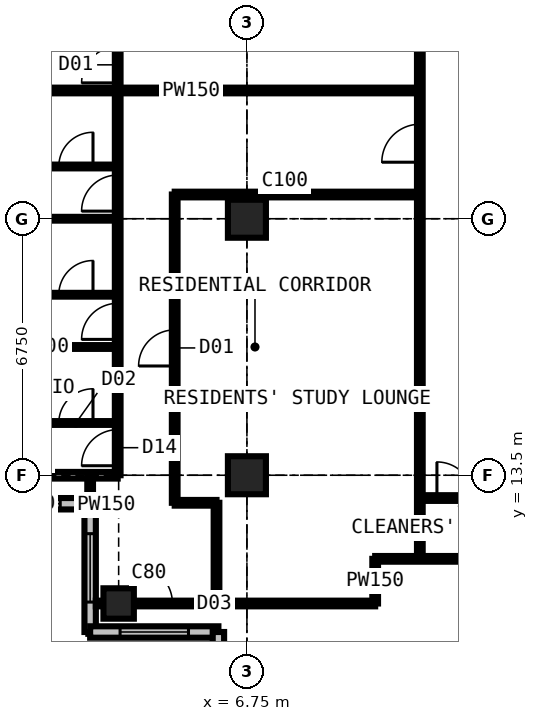
"""IFC4 building model, lengths in metres.
Left out: names, types, materials, properties, quantities, classifications, styles, units other than length and angle.
Written with IfcOpenShell. Run it as: python <this file> out.ifc"""

import sys

from ifc_helpers import new_model, si_unit, direction, frame, frame_2d, origin, origin_2d, place, context, subcontext, project, spatial, rectangle, extrude, element, fill, save


model = new_model("IFC4")
c1 = context("Model", 3, precision=1e-05, world=origin(), true_north=direction((0.0, 1.0)))
c2 = subcontext(c1, "Body", "Model", "MODEL_VIEW")
j1 = project(units=[si_unit("LENGTHUNIT", "METRE"), si_unit("PLANEANGLEUNIT", "RADIAN")], contexts=[c1])
p1 = place(None, origin())
s1 = spatial("IfcSite", under=j1, at=p1, CompositionType="ELEMENT")
p2 = place(p1, origin())
s2 = spatial("IfcBuilding", under=s1, at=p2, CompositionType="ELEMENT")
p3 = place(p2, frame((0.0, 0.0, 240.3)))
s3 = spatial("IfcBuildingStorey", under=s2, at=p3, CompositionType="ELEMENT", Elevation=240.3)
p4 = place(p3, frame((3.375, 10.125, 0.0), z_axis=(0.0, 0.0, 1.0), x_axis=(1.0, 0.0, 0.0)))
e1 = element("IfcColumn", 1, at=p4, inside=s3, PredefinedType="COLUMN", context=c2, shape_type="SweptSolid", body=[
    extrude(rectangle(XDim=0.8, YDim=0.8, at=origin_2d()), origin(), (0.0, 0.0, 1.0), 3.6),
])
for number, where, z_axis, x_axis in (
    (2, (6.75, 13.5, 0.0), (0.0, 0.0, 1.0), (1.0, 0.0, 0.0)),
    (3, (6.75, 20.25, 0.0), (0.0, 0.0, 1.0), (1.0, 0.0, 0.0)),
):
    element("IfcColumn", number, at=place(p3, frame(where, z_axis=z_axis, x_axis=x_axis)), inside=s3, PredefinedType="COLUMN", context=c2, shape_type="SweptSolid", body=[
        extrude(rectangle(XDim=1.0, YDim=1.0, at=origin_2d()), origin(), (0.0, 0.0, 1.0), 3.6),
    ])
p5 = place(p3, frame((-0.75, 12.75, 0.0), z_axis=(0.0, 0.0, 1.0), x_axis=(1.0, 0.0, 0.0)))
e4 = element("IfcWall", 4, at=p5, inside=s3, PredefinedType="SOLIDWALL", context=c2, shape_type="SweptSolid", body=[
    extrude(rectangle(XDim=3.375, YDim=0.3, at=frame_2d((1.688, 0.0))), origin(), (0.0, 0.0, 1.0), 3.375),
])
p6 = place(p5, frame((0.788, 0.0, 0.6)))
e5 = element("IfcOpeningElement", 5, at=p6, cuts=e4, PredefinedType="OPENING", context=c2, shape_type="SweptSolid", body=[
    extrude(rectangle(XDim=1.8, YDim=2.1, at=frame_2d((0.9, 1.05))), frame((0.0, 0.16, 0.0), z_axis=(0.0, -1.0, 0.0), x_axis=(1.0, 0.0, 0.0)), (0.0, 0.0, 1.0), 0.32),
])
p7 = place(p3, frame((2.625, 12.75, 0.0), z_axis=(0.0, 0.0, 1.0), x_axis=(0.0, -1.0, 0.0)))
e6 = element("IfcWall", 6, at=p7, inside=s3, PredefinedType="SOLIDWALL", context=c2, shape_type="SweptSolid", body=[
    extrude(rectangle(XDim=3.375, YDim=0.3, at=frame_2d((1.688, 0.0))), origin(), (0.0, 0.0, 1.0), 3.375),
])
p8 = place(p7, frame((0.788, 0.0, 0.6)))
e7 = element("IfcOpeningElement", 7, at=p8, cuts=e6, PredefinedType="OPENING", context=c2, shape_type="SweptSolid", body=[
    extrude(rectangle(XDim=1.8, YDim=2.1, at=frame_2d((0.9, 1.05))), frame((0.0, 0.16, 0.0), z_axis=(0.0, -1.0, 0.0), x_axis=(1.0, 0.0, 0.0)), (0.0, 0.0, 1.0), 0.32),
])
p9 = place(p3, frame((2.625, 9.375, 0.0), z_axis=(0.0, 0.0, 1.0), x_axis=(1.0, 0.0, 0.0)))
e8 = element("IfcWall", 8, at=p9, inside=s3, PredefinedType="SOLIDWALL", context=c2, shape_type="SweptSolid", body=[
    extrude(rectangle(XDim=3.375, YDim=0.3, at=frame_2d((1.688, 0.0))), origin(), (0.0, 0.0, 1.0), 3.375),
])
p10 = place(p9, frame((0.788, 0.0, 0.6)))
e9 = element("IfcOpeningElement", 9, at=p10, cuts=e8, PredefinedType="OPENING", context=c2, shape_type="SweptSolid", body=[
    extrude(rectangle(XDim=1.8, YDim=2.1, at=frame_2d((0.9, 1.05))), frame((0.0, 0.16, 0.0), z_axis=(0.0, -1.0, 0.0), x_axis=(1.0, 0.0, 0.0)), (0.0, 0.0, 1.0), 0.32),
])
p11 = place(p3, frame((6.0, 9.375, 0.0), z_axis=(0.0, 0.0, 1.0), x_axis=(0.0, -1.0, 0.0)))
e10 = element("IfcWall", 10, at=p11, inside=s3, PredefinedType="SOLIDWALL", context=c2, shape_type="SweptSolid", body=[
    extrude(rectangle(XDim=3.375, YDim=0.3, at=frame_2d((1.688, 0.0))), origin(), (0.0, 0.0, 1.0), 3.375),
])
p12 = place(p11, frame((0.788, 0.0, 0.6)))
e11 = element("IfcOpeningElement", 11, at=p12, cuts=e10, PredefinedType="OPENING", context=c2, shape_type="SweptSolid", body=[
    extrude(rectangle(XDim=1.8, YDim=2.1, at=frame_2d((0.9, 1.05))), frame((0.0, 0.16, 0.0), z_axis=(0.0, -1.0, 0.0), x_axis=(1.0, 0.0, 0.0)), (0.0, 0.0, 1.0), 0.32),
])
p13 = place(p3, frame((-0.734, 13.5, 0.0), z_axis=(0.0, 0.0, 1.0), x_axis=(1.0, 0.0, 0.0)))
e12 = element("IfcWall", 12, at=p13, inside=s3, PredefinedType="PARTITIONING", context=c2, shape_type="SweptSolid", body=[
    extrude(rectangle(XDim=4.084, YDim=0.175, at=frame_2d((2.042, 0.0))), origin(), (0.0, 0.0, 1.0), 2.877),
])
p14 = place(p3, frame((-0.734, 16.875, 0.0), z_axis=(0.0, 0.0, 1.0), x_axis=(1.0, 0.0, 0.0)))
e13 = element("IfcWall", 13, at=p14, inside=s3, PredefinedType="PARTITIONING", context=c2, shape_type="SweptSolid", body=[
    extrude(rectangle(XDim=4.084, YDim=0.1, at=frame_2d((2.042, 0.0))), origin(), (0.0, 0.0, 1.0), 3.375),
])
p15 = place(p3, frame((-0.734, 20.25, 0.0), z_axis=(0.0, 0.0, 1.0), x_axis=(1.0, 0.0, 0.0)))
e14 = element("IfcWall", 14, at=p15, inside=s3, PredefinedType="PARTITIONING", context=c2, shape_type="SweptSolid", body=[
    extrude(rectangle(XDim=4.084, YDim=0.1, at=frame_2d((2.042, 0.0))), origin(), (0.0, 0.0, 1.0), 2.877),
])
p16 = place(p3, frame((-0.734, 23.625, 0.0), z_axis=(0.0, 0.0, 1.0), x_axis=(1.0, 0.0, 0.0)))
e15 = element("IfcWall", 15, at=p16, inside=s3, PredefinedType="PARTITIONING", context=c2, shape_type="SweptSolid", body=[
    extrude(rectangle(XDim=12.034, YDim=0.15, at=frame_2d((6.017, 0.0))), origin(), (0.0, 0.0, 1.0), 3.375),
])
p17 = place(p3, frame((1.15, 14.875, 0.0), z_axis=(0.0, 0.0, 1.0), x_axis=(1.0, 0.0, 0.0)))
e16 = element("IfcWall", 16, at=p17, inside=s3, PredefinedType="PARTITIONING", context=c2, shape_type="SweptSolid", body=[
    extrude(rectangle(XDim=2.2, YDim=0.1, at=frame_2d((1.1, 0.0))), origin(), (0.0, 0.0, 1.0), 3.375),
])
p18 = place(p17, frame((0.65, 0.0, 0.0)))
e17 = element("IfcOpeningElement", 17, at=p18, cuts=e16, PredefinedType="OPENING", context=c2, shape_type="SweptSolid", body=[
    extrude(rectangle(XDim=0.9, YDim=2.2, at=frame_2d((0.45, 1.1))), frame((0.0, 0.06, 0.0), z_axis=(0.0, -1.0, 0.0), x_axis=(1.0, 0.0, 0.0)), (0.0, 0.0, 1.0), 0.12),
])
p19 = place(p3, frame((1.15, 18.25, 0.0), z_axis=(0.0, 0.0, 1.0), x_axis=(1.0, 0.0, 0.0)))
e18 = element("IfcWall", 18, at=p19, inside=s3, PredefinedType="PARTITIONING", context=c2, shape_type="SweptSolid", body=[
    extrude(rectangle(XDim=2.2, YDim=0.1, at=frame_2d((1.1, 0.0))), origin(), (0.0, 0.0, 1.0), 3.375),
])
p20 = place(p19, frame((0.65, 0.0, 0.0)))
e19 = element("IfcOpeningElement", 19, at=p20, cuts=e18, PredefinedType="OPENING", context=c2, shape_type="SweptSolid", body=[
    extrude(rectangle(XDim=0.9, YDim=2.2, at=frame_2d((0.45, 1.1))), frame((0.0, 0.06, 0.0), z_axis=(0.0, -1.0, 0.0), x_axis=(1.0, 0.0, 0.0)), (0.0, 0.0, 1.0), 0.12),
])
p21 = place(p3, frame((1.15, 21.625, 0.0), z_axis=(0.0, 0.0, 1.0), x_axis=(1.0, 0.0, 0.0)))
e20 = element("IfcWall", 20, at=p21, inside=s3, PredefinedType="PARTITIONING", context=c2, shape_type="SweptSolid", body=[
    extrude(rectangle(XDim=2.2, YDim=0.1, at=frame_2d((1.1, 0.0))), origin(), (0.0, 0.0, 1.0), 3.375),
])
p22 = place(p21, frame((0.65, 0.0, 0.0)))
e21 = element("IfcOpeningElement", 21, at=p22, cuts=e20, PredefinedType="OPENING", context=c2, shape_type="SweptSolid", body=[
    extrude(rectangle(XDim=0.9, YDim=2.2, at=frame_2d((0.45, 1.1))), frame((0.0, 0.06, 0.0), z_axis=(0.0, -1.0, 0.0), x_axis=(1.0, 0.0, 0.0)), (0.0, 0.0, 1.0), 0.12),
])
p23 = place(p3, frame((2.625, 12.766, 0.0), z_axis=(0.0, 0.0, 1.0), x_axis=(0.0, 1.0, 0.0)))
e22 = element("IfcWall", 22, at=p23, inside=s3, PredefinedType="PARTITIONING", context=c2, shape_type="SweptSolid", body=[
    extrude(rectangle(XDim=0.734, YDim=0.15, at=frame_2d((0.367, 0.0))), origin(), (0.0, 0.0, 1.0), 3.375),
])
p24 = place(p3, frame((2.775, 10.125, 0.0), z_axis=(0.0, 0.0, 1.0), x_axis=(1.0, 0.0, 0.0)))
e23 = element("IfcWall", 23, at=p24, inside=s3, PredefinedType="PARTITIONING", context=c2, shape_type="SweptSolid", body=[
    extrude(rectangle(XDim=7.35, YDim=0.15, at=frame_2d((3.675, 0.0))), origin(), (0.0, 0.0, 1.0), 2.877),
])
p25 = place(p24, frame((1.016, 0.0, 0.0)))
e24 = element("IfcOpeningElement", 24, at=p25, cuts=e23, PredefinedType="OPENING", context=c2, shape_type="SweptSolid", body=[
    extrude(rectangle(XDim=1.0, YDim=2.2, at=frame_2d((0.5, 1.1))), frame((0.0, 0.085, 0.0), z_axis=(0.0, -1.0, 0.0), x_axis=(1.0, 0.0, 0.0)), (0.0, 0.0, 1.0), 0.17),
])
p26 = place(p3, frame((3.35, 13.5, 0.0), z_axis=(0.0, 0.0, 1.0), x_axis=(0.0, 1.0, 0.0)))
e25 = element("IfcWall", 25, at=p26, inside=s3, PredefinedType="PARTITIONING", context=c2, shape_type="SweptSolid", body=[
    extrude(rectangle(XDim=13.5, YDim=0.15, at=frame_2d((6.75, 0.0))), origin(), (0.0, 0.0, 1.0), 3.375),
])
p27 = place(p26, frame((10.325, 0.0, 0.0)))
e26 = element("IfcOpeningElement", 26, at=p27, cuts=e25, PredefinedType="OPENING", context=c2, shape_type="SweptSolid", body=[
    extrude(rectangle(XDim=0.95, YDim=2.2, at=frame_2d((0.475, 1.1))), frame((0.0, 0.085, 0.0), z_axis=(0.0, -1.0, 0.0), x_axis=(1.0, 0.0, 0.0)), (0.0, 0.0, 1.0), 0.17),
])
p28 = place(p26, frame((0.25, 0.0, 0.0)))
e27 = element("IfcOpeningElement", 27, at=p28, cuts=e25, PredefinedType="OPENING", context=c2, shape_type="SweptSolid", body=[
    extrude(rectangle(XDim=0.95, YDim=2.2, at=frame_2d((0.475, 1.1))), frame((0.0, 0.085, 0.0), z_axis=(0.0, -1.0, 0.0), x_axis=(1.0, 0.0, 0.0)), (0.0, 0.0, 1.0), 0.17),
])
p29 = place(p26, frame((3.575, 0.0, 0.0)))
e28 = element("IfcOpeningElement", 28, at=p29, cuts=e25, PredefinedType="OPENING", context=c2, shape_type="SweptSolid", body=[
    extrude(rectangle(XDim=0.95, YDim=2.2, at=frame_2d((0.475, 1.1))), frame((0.0, 0.085, 0.0), z_axis=(0.0, -1.0, 0.0), x_axis=(1.0, 0.0, 0.0)), (0.0, 0.0, 1.0), 0.17),
])
p30 = place(p26, frame((6.95, 0.0, 0.0)))
e29 = element("IfcOpeningElement", 29, at=p30, cuts=e25, PredefinedType="OPENING", context=c2, shape_type="SweptSolid", body=[
    extrude(rectangle(XDim=0.95, YDim=2.2, at=frame_2d((0.475, 1.1))), frame((0.0, 0.085, 0.0), z_axis=(0.0, -1.0, 0.0), x_axis=(1.0, 0.0, 0.0)), (0.0, 0.0, 1.0), 0.17),
])
p31 = place(p3, frame((4.85, 12.775, 0.0), z_axis=(0.0, 0.0, 1.0), x_axis=(0.0, 1.0, 0.0)))
e30 = element("IfcWall", 30, at=p31, inside=s3, PredefinedType="PARTITIONING", context=c2, shape_type="SweptSolid", body=[
    extrude(rectangle(XDim=8.113, YDim=0.15, at=frame_2d((4.056, 0.0))), origin(), (0.0, 0.0, 1.0), 3.375),
])
p32 = place(p31, frame((3.6, 0.0, 0.0)))
e31 = element("IfcOpeningElement", 31, at=p32, cuts=e30, PredefinedType="OPENING", context=c2, shape_type="SweptSolid", body=[
    extrude(rectangle(XDim=0.95, YDim=2.2, at=frame_2d((0.475, 1.1))), frame((0.0, 0.085, 0.0), z_axis=(0.0, -1.0, 0.0), x_axis=(1.0, 0.0, 0.0)), (0.0, 0.0, 1.0), 0.17),
])
p33 = place(p3, frame((4.85, 12.775, 0.0), z_axis=(0.0, 0.0, 1.0), x_axis=(1.0, 0.0, 0.0)))
e32 = element("IfcWall", 32, at=p33, inside=s3, PredefinedType="PARTITIONING", context=c2, shape_type="SweptSolid", body=[
    extrude(rectangle(XDim=1.1, YDim=0.15, at=frame_2d((0.55, 0.0))), origin(), (0.0, 0.0, 1.0), 3.375),
])
p34 = place(p3, frame((4.85, 20.887, 0.0), z_axis=(0.0, 0.0, 1.0), x_axis=(1.0, 0.0, 0.0)))
e33 = element("IfcWall", 33, at=p34, inside=s3, PredefinedType="PARTITIONING", context=c2, shape_type="SweptSolid", body=[
    extrude(rectangle(XDim=6.45, YDim=0.15, at=frame_2d((3.225, 0.0))), origin(), (0.0, 0.0, 1.0), 3.375),
])
p35 = place(p3, frame((5.95, 10.125, 0.0), z_axis=(0.0, 0.0, 1.0), x_axis=(0.0, 1.0, 0.0)))
e34 = element("IfcWall", 34, at=p35, inside=s3, PredefinedType="PARTITIONING", context=c2, shape_type="SweptSolid", body=[
    extrude(rectangle(XDim=2.65, YDim=0.15, at=frame_2d((1.325, 0.0))), origin(), (0.0, 0.0, 1.0), 3.375),
])
p36 = place(p3, frame((10.125, 10.125, 0.0), z_axis=(0.0, 0.0, 1.0), x_axis=(0.0, 1.0, 0.0)))
e35 = element("IfcWall", 35, at=p36, inside=s3, PredefinedType="PARTITIONING", context=c2, shape_type="SweptSolid", body=[
    extrude(rectangle(XDim=1.175, YDim=0.15, at=frame_2d((0.587, 0.0))), origin(), (0.0, 0.0, 1.0), 3.375),
])
p37 = place(p3, frame((10.125, 11.3, 0.0), z_axis=(0.0, 0.0, 1.0), x_axis=(1.0, 0.0, 0.0)))
e36 = element("IfcWall", 36, at=p37, inside=s3, PredefinedType="PARTITIONING", context=c2, shape_type="SweptSolid", body=[
    extrude(rectangle(XDim=20.25, YDim=0.15, at=frame_2d((10.125, 0.0))), origin(), (0.0, 0.0, 1.0), 3.375),
])
p38 = place(p37, frame((6.95, 0.0, 0.0)))
e37 = element("IfcOpeningElement", 37, at=p38, cuts=e36, PredefinedType="OPENING", context=c2, shape_type="SweptSolid", body=[
    extrude(rectangle(XDim=0.95, YDim=2.2, at=frame_2d((0.475, 1.1))), frame((0.0, 0.085, 0.0), z_axis=(0.0, -1.0, 0.0), x_axis=(1.0, 0.0, 0.0)), (0.0, 0.0, 1.0), 0.17),
])
p39 = place(p37, frame((10.375, 0.0, 0.0)))
e38 = element("IfcOpeningElement", 38, at=p39, cuts=e36, PredefinedType="OPENING", context=c2, shape_type="SweptSolid", body=[
    extrude(rectangle(XDim=0.95, YDim=2.2, at=frame_2d((0.475, 1.1))), frame((0.0, 0.085, 0.0), z_axis=(0.0, -1.0, 0.0), x_axis=(1.0, 0.0, 0.0)), (0.0, 0.0, 1.0), 0.17),
])
p40 = place(p37, frame((13.75, 0.0, 0.0)))
e39 = element("IfcOpeningElement", 39, at=p40, cuts=e36, PredefinedType="OPENING", context=c2, shape_type="SweptSolid", body=[
    extrude(rectangle(XDim=0.95, YDim=2.2, at=frame_2d((0.475, 1.1))), frame((0.0, 0.085, 0.0), z_axis=(0.0, -1.0, 0.0), x_axis=(1.0, 0.0, 0.0)), (0.0, 0.0, 1.0), 0.17),
])
p41 = place(p37, frame((17.475, 0.0, 0.0)))
e40 = element("IfcOpeningElement", 40, at=p41, cuts=e36, PredefinedType="OPENING", context=c2, shape_type="SweptSolid", body=[
    extrude(rectangle(XDim=1.0, YDim=2.2, at=frame_2d((0.5, 1.1))), frame((0.0, 0.085, 0.0), z_axis=(0.0, -1.0, 0.0), x_axis=(1.0, 0.0, 0.0)), (0.0, 0.0, 1.0), 0.17),
])
p42 = place(p3, frame((11.3, 11.3, 0.0), z_axis=(0.0, 0.0, 1.0), x_axis=(0.0, 1.0, 0.0)))
e41 = element("IfcWall", 41, at=p42, inside=s3, PredefinedType="PARTITIONING", context=c2, shape_type="SweptSolid", body=[
    extrude(rectangle(XDim=19.3, YDim=0.15, at=frame_2d((9.65, 0.0))), origin(), (0.0, 0.0, 1.0), 3.375),
])
p43 = place(p42, frame((13.525, 0.0, 0.0)))
e42 = element("IfcOpeningElement", 42, at=p43, cuts=e41, PredefinedType="OPENING", context=c2, shape_type="SweptSolid", body=[
    extrude(rectangle(XDim=1.0, YDim=2.2, at=frame_2d((0.5, 1.1))), frame((0.0, 0.085, 0.0), z_axis=(0.0, -1.0, 0.0), x_axis=(1.0, 0.0, 0.0)), (0.0, 0.0, 1.0), 0.17),
])
p44 = place(p42, frame((10.438, 0.0, 0.0)))
e43 = element("IfcOpeningElement", 43, at=p44, cuts=e41, PredefinedType="OPENING", context=c2, shape_type="SweptSolid", body=[
    extrude(rectangle(XDim=1.0, YDim=2.2, at=frame_2d((0.5, 1.1))), frame((0.0, 0.085, 0.0), z_axis=(0.0, -1.0, 0.0), x_axis=(1.0, 0.0, 0.0)), (0.0, 0.0, 1.0), 0.17),
])
p45 = place(p3, frame((11.3, 12.9, 0.0), z_axis=(0.0, 0.0, 1.0), x_axis=(1.0, 0.0, 0.0)))
e44 = element("IfcWall", 44, at=p45, inside=s3, PredefinedType="PARTITIONING", context=c2, shape_type="SweptSolid", body=[
    extrude(rectangle(XDim=1.9, YDim=0.15, at=frame_2d((0.95, 0.0))), origin(), (0.0, 0.0, 1.0), 2.877),
])
p46 = place(p45, frame((0.45, 0.0, 0.0)))
e45 = element("IfcOpeningElement", 45, at=p46, cuts=e44, PredefinedType="OPENING", context=c2, shape_type="SweptSolid", body=[
    extrude(rectangle(XDim=0.95, YDim=2.2, at=frame_2d((0.475, 1.1))), frame((0.0, 0.085, 0.0), z_axis=(0.0, -1.0, 0.0), x_axis=(1.0, 0.0, 0.0)), (0.0, 0.0, 1.0), 0.17),
])
p47 = place(p6, origin())
e46 = element("IfcWindow", 46, at=p47, inside=s3, PartitioningType="SINGLE_PANEL", PredefinedType="WINDOW", context=c2, shape_type="SweptSolid", body=[
    extrude(rectangle(XDim=1.8, YDim=2.1, at=frame_2d((0.9, 1.05))), frame((0.0, 0.03, 0.0), z_axis=(0.0, -1.0, 0.0), x_axis=(1.0, 0.0, 0.0)), (0.0, 0.0, 1.0), 0.06),
])
fill(e5, e46)
p48 = place(p8, origin())
e47 = element("IfcWindow", 47, at=p48, inside=s3, PartitioningType="SINGLE_PANEL", PredefinedType="WINDOW", context=c2, shape_type="SweptSolid", body=[
    extrude(rectangle(XDim=1.8, YDim=2.1, at=frame_2d((0.9, 1.05))), frame((0.0, 0.03, 0.0), z_axis=(0.0, -1.0, 0.0), x_axis=(1.0, 0.0, 0.0)), (0.0, 0.0, 1.0), 0.06),
])
fill(e7, e47)
p49 = place(p10, origin())
e48 = element("IfcWindow", 48, at=p49, inside=s3, PartitioningType="SINGLE_PANEL", PredefinedType="WINDOW", context=c2, shape_type="SweptSolid", body=[
    extrude(rectangle(XDim=1.8, YDim=2.1, at=frame_2d((0.9, 1.05))), frame((0.0, 0.03, 0.0), z_axis=(0.0, -1.0, 0.0), x_axis=(1.0, 0.0, 0.0)), (0.0, 0.0, 1.0), 0.06),
])
fill(e9, e48)
p50 = place(p46, origin())
e49 = element("IfcDoor", 49, at=p50, inside=s3, OperationType="SINGLE_SWING_LEFT", PredefinedType="DOOR", context=c2, shape_type="SweptSolid", body=[
    extrude(rectangle(XDim=0.95, YDim=2.2, at=frame_2d((0.475, 1.1))), frame((0.0, 0.025, 0.0), z_axis=(0.0, -1.0, 0.0), x_axis=(1.0, 0.0, 0.0)), (0.0, 0.0, 1.0), 0.05),
])
fill(e45, e49)
p51 = place(p25, origin())
e50 = element("IfcDoor", 50, at=p51, inside=s3, OperationType="SINGLE_SWING_LEFT", PredefinedType="DOOR", context=c2, shape_type="SweptSolid", body=[
    extrude(rectangle(XDim=1.0, YDim=2.2, at=frame_2d((0.5, 1.1))), frame((0.0, 0.025, 0.0), z_axis=(0.0, -1.0, 0.0), x_axis=(1.0, 0.0, 0.0)), (0.0, 0.0, 1.0), 0.05),
])
fill(e24, e50)
p52 = place(p27, origin())
e51 = element("IfcDoor", 51, at=p52, inside=s3, OperationType="SINGLE_SWING_LEFT", PredefinedType="DOOR", context=c2, shape_type="SweptSolid", body=[
    extrude(rectangle(XDim=0.95, YDim=2.2, at=frame_2d((0.475, 1.1))), frame((0.0, 0.025, 0.0), z_axis=(0.0, -1.0, 0.0), x_axis=(1.0, 0.0, 0.0)), (0.0, 0.0, 1.0), 0.05),
])
fill(e26, e51)
p53 = place(p28, origin())
e52 = element("IfcDoor", 52, at=p53, inside=s3, OperationType="SINGLE_SWING_LEFT", PredefinedType="DOOR", context=c2, shape_type="SweptSolid", body=[
    extrude(rectangle(XDim=0.95, YDim=2.2, at=frame_2d((0.475, 1.1))), frame((0.0, 0.025, 0.0), z_axis=(0.0, -1.0, 0.0), x_axis=(1.0, 0.0, 0.0)), (0.0, 0.0, 1.0), 0.05),
])
fill(e27, e52)
p54 = place(p18, origin())
e53 = element("IfcDoor", 53, at=p54, inside=s3, OperationType="SINGLE_SWING_RIGHT", PredefinedType="DOOR", context=c2, shape_type="SweptSolid", body=[
    extrude(rectangle(XDim=0.9, YDim=2.2, at=frame_2d((0.45, 1.1))), frame((0.0, 0.025, 0.0), z_axis=(0.0, -1.0, 0.0), x_axis=(1.0, 0.0, 0.0)), (0.0, 0.0, 1.0), 0.05),
])
fill(e17, e53)
p55 = place(p29, origin())
e54 = element("IfcDoor", 54, at=p55, inside=s3, OperationType="SINGLE_SWING_LEFT", PredefinedType="DOOR", context=c2, shape_type="SweptSolid", body=[
    extrude(rectangle(XDim=0.95, YDim=2.2, at=frame_2d((0.475, 1.1))), frame((0.0, 0.025, 0.0), z_axis=(0.0, -1.0, 0.0), x_axis=(1.0, 0.0, 0.0)), (0.0, 0.0, 1.0), 0.05),
])
fill(e28, e54)
p56 = place(p20, origin())
e55 = element("IfcDoor", 55, at=p56, inside=s3, OperationType="SINGLE_SWING_RIGHT", PredefinedType="DOOR", context=c2, shape_type="SweptSolid", body=[
    extrude(rectangle(XDim=0.9, YDim=2.2, at=frame_2d((0.45, 1.1))), frame((0.0, 0.025, 0.0), z_axis=(0.0, -1.0, 0.0), x_axis=(1.0, 0.0, 0.0)), (0.0, 0.0, 1.0), 0.05),
])
fill(e19, e55)
p57 = place(p30, origin())
e56 = element("IfcDoor", 56, at=p57, inside=s3, OperationType="SINGLE_SWING_LEFT", PredefinedType="DOOR", context=c2, shape_type="SweptSolid", body=[
    extrude(rectangle(XDim=0.95, YDim=2.2, at=frame_2d((0.475, 1.1))), frame((0.0, 0.025, 0.0), z_axis=(0.0, -1.0, 0.0), x_axis=(1.0, 0.0, 0.0)), (0.0, 0.0, 1.0), 0.05),
])
fill(e29, e56)
p58 = place(p22, origin())
e57 = element("IfcDoor", 57, at=p58, inside=s3, OperationType="SINGLE_SWING_RIGHT", PredefinedType="DOOR", context=c2, shape_type="SweptSolid", body=[
    extrude(rectangle(XDim=0.9, YDim=2.2, at=frame_2d((0.45, 1.1))), frame((0.0, 0.025, 0.0), z_axis=(0.0, -1.0, 0.0), x_axis=(1.0, 0.0, 0.0)), (0.0, 0.0, 1.0), 0.05),
])
fill(e21, e57)
p59 = place(p44, origin())
e58 = element("IfcDoor", 58, at=p59, inside=s3, OperationType="SINGLE_SWING_LEFT", PredefinedType="DOOR", context=c2, shape_type="SweptSolid", body=[
    extrude(rectangle(XDim=1.0, YDim=2.2, at=frame_2d((0.5, 1.1))), frame((0.0, 0.025, 0.0), z_axis=(0.0, -1.0, 0.0), x_axis=(1.0, 0.0, 0.0)), (0.0, 0.0, 1.0), 0.05),
])
fill(e43, e58)
p60 = place(p32, origin())
e59 = element("IfcDoor", 59, at=p60, inside=s3, OperationType="SINGLE_SWING_LEFT", PredefinedType="DOOR", context=c2, shape_type="SweptSolid", body=[
    extrude(rectangle(XDim=0.95, YDim=2.2, at=frame_2d((0.475, 1.1))), frame((0.0, 0.025, 0.0), z_axis=(0.0, -1.0, 0.0), x_axis=(1.0, 0.0, 0.0)), (0.0, 0.0, 1.0), 0.05),
])
fill(e31, e59)
save(model, sys.argv[1])
